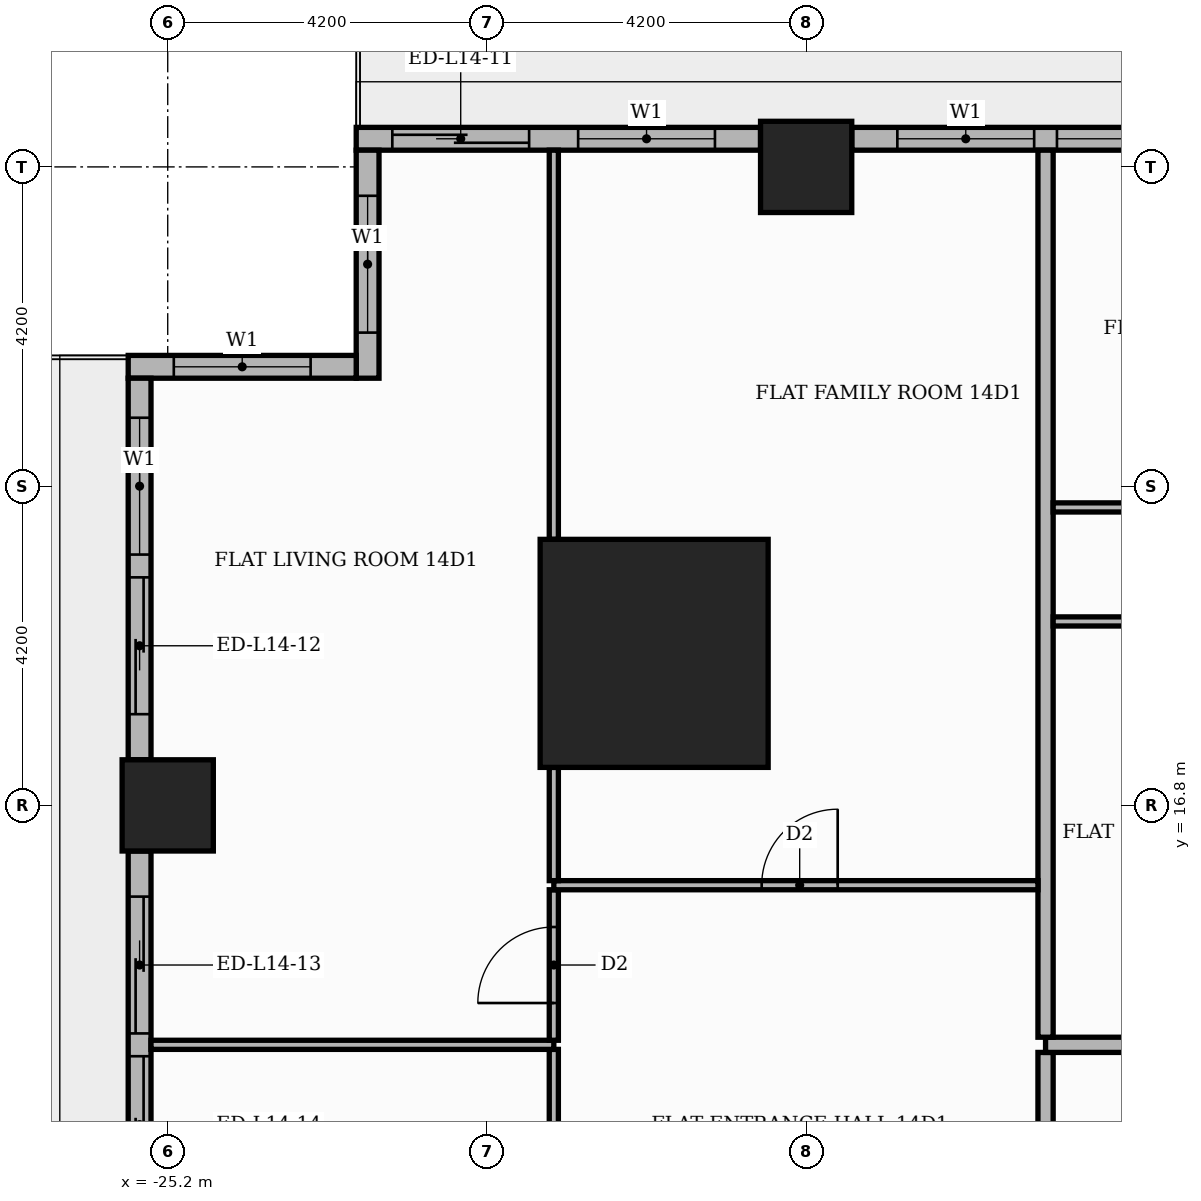
"""IFC4 building model, lengths in metres.
Left out: names, types, materials, properties, quantities, classifications, styles, units other than length and angle.
Written with IfcOpenShell. Run it as: python <this file> out.ifc"""

import sys

from ifc_helpers import new_model, si_unit, direction, frame, frame_2d, origin, origin_2d, place, context, subcontext, project, spatial, rectangle, extrude, element, fill, save


model = new_model("IFC4")
c1 = context("Model", 3, precision=1e-05, world=origin(), true_north=direction((0.0, 1.0)))
c2 = subcontext(c1, "Body", "Model", "MODEL_VIEW")
j1 = project(units=[si_unit("LENGTHUNIT", "METRE"), si_unit("PLANEANGLEUNIT", "RADIAN")], contexts=[c1])
p1 = place(None, origin())
s1 = spatial("IfcSite", under=j1, at=p1, CompositionType="ELEMENT")
p2 = place(p1, origin())
s2 = spatial("IfcBuilding", under=s1, at=p2, CompositionType="ELEMENT")
p3 = place(p2, frame((0.0, 0.0, 62.1)))
s3 = spatial("IfcBuildingStorey", under=s2, at=p3, CompositionType="ELEMENT", Elevation=62.1)
p4 = place(p3, frame((-18.8, 18.8, 0.0), z_axis=(0.0, 0.0, 1.0), x_axis=(1.0, 0.0, 0.0)))
e1 = element("IfcColumn", 1, at=p4, inside=s3, PredefinedType="COLUMN", context=c2, shape_type="SweptSolid", body=[
    extrude(rectangle(XDim=3.0, YDim=3.0, at=origin_2d()), origin(), (0.0, 0.0, 1.0), 3.9),
])
for number, where, z_axis, x_axis in (
    (2, (-16.8, 25.2, 0.0), (0.0, 0.0, 1.0), (1.0, 0.0, 0.0)),
    (3, (-25.2, 16.8, 0.0), (0.0, 0.0, 1.0), (1.0, 0.0, 0.0)),
):
    element("IfcColumn", number, at=place(p3, frame(where, z_axis=z_axis, x_axis=x_axis)), inside=s3, PredefinedType="COLUMN", context=c2, shape_type="SweptSolid", body=[
        extrude(rectangle(XDim=1.2, YDim=1.2, at=origin_2d()), origin(), (0.0, 0.0, 1.0), 3.9),
    ])
p5 = place(p3, frame((-9.0, 25.57, 0.0), z_axis=(0.0, 0.0, 1.0), x_axis=(-1.0, 0.0, 0.0)))
e4 = element("IfcWall", 4, at=p5, inside=s3, PredefinedType="STANDARD", context=c2, shape_type="SweptSolid", body=[
    extrude(rectangle(XDim=7.2, YDim=0.3, at=frame_2d((3.6, 0.0))), origin(), (0.0, 0.0, 1.0), 3.48),
])
p6 = place(p5, frame((0.6, 0.0, 0.9)))
e5 = element("IfcOpeningElement", 5, at=p6, cuts=e4, PredefinedType="OPENING", context=c2, shape_type="SweptSolid", body=[
    extrude(rectangle(XDim=3.9, YDim=2.1, at=frame_2d((1.95, 1.05))), frame((0.0, 0.16, 0.0), z_axis=(0.0, -1.0, 0.0), x_axis=(1.0, 0.0, 0.0)), (0.0, 0.0, 1.0), 0.32),
])
p7 = place(p5, frame((4.8, 0.0, 0.9)))
e6 = element("IfcOpeningElement", 6, at=p7, cuts=e4, PredefinedType="OPENING", context=c2, shape_type="SweptSolid", body=[
    extrude(rectangle(XDim=1.8, YDim=2.1, at=frame_2d((0.9, 1.05))), frame((0.0, 0.16, 0.0), z_axis=(0.0, -1.0, 0.0), x_axis=(1.0, 0.0, 0.0)), (0.0, 0.0, 1.0), 0.32),
])
p8 = place(p3, frame((-17.4, 25.57, 0.0), z_axis=(0.0, 0.0, 1.0), x_axis=(-1.0, 0.0, 0.0)))
e7 = element("IfcWall", 7, at=p8, inside=s3, PredefinedType="STANDARD", context=c2, shape_type="SweptSolid", body=[
    extrude(rectangle(XDim=5.32, YDim=0.3, at=frame_2d((2.66, 0.0))), origin(), (0.0, 0.0, 1.0), 3.48),
])
p9 = place(p8, frame((0.6, 0.0, 0.9)))
e8 = element("IfcOpeningElement", 8, at=p9, cuts=e7, PredefinedType="OPENING", context=c2, shape_type="SweptSolid", body=[
    extrude(rectangle(XDim=1.8, YDim=2.1, at=frame_2d((0.9, 1.05))), frame((0.0, 0.16, 0.0), z_axis=(0.0, -1.0, 0.0), x_axis=(1.0, 0.0, 0.0)), (0.0, 0.0, 1.0), 0.32),
])
p10 = place(p8, frame((3.045, 0.0, 0.0)))
e9 = element("IfcOpeningElement", 9, at=p10, cuts=e7, PredefinedType="OPENING", context=c2, shape_type="SweptSolid", body=[
    extrude(rectangle(XDim=1.8, YDim=2.4, at=frame_2d((0.9, 1.2))), frame((0.0, 0.16, 0.0), z_axis=(0.0, -1.0, 0.0), x_axis=(1.0, 0.0, 0.0)), (0.0, 0.0, 1.0), 0.32),
])
p11 = place(p3, frame((-22.57, 25.42, 0.0), z_axis=(0.0, 0.0, 1.0), x_axis=(0.0, -1.0, 0.0)))
e10 = element("IfcWall", 10, at=p11, inside=s3, PredefinedType="STANDARD", context=c2, shape_type="SweptSolid", body=[
    extrude(rectangle(XDim=3.0, YDim=0.3, at=frame_2d((1.5, 0.0))), origin(), (0.0, 0.0, 1.0), 3.48),
])
p12 = place(p11, frame((0.6, 0.0, 0.9)))
e11 = element("IfcOpeningElement", 11, at=p12, cuts=e10, PredefinedType="OPENING", context=c2, shape_type="SweptSolid", body=[
    extrude(rectangle(XDim=1.8, YDim=2.1, at=frame_2d((0.9, 1.05))), frame((0.0, 0.16, 0.0), z_axis=(0.0, -1.0, 0.0), x_axis=(1.0, 0.0, 0.0)), (0.0, 0.0, 1.0), 0.32),
])
p13 = place(p3, frame((-22.72, 22.57, 0.0), z_axis=(0.0, 0.0, 1.0), x_axis=(-1.0, 0.0, 0.0)))
e12 = element("IfcWall", 12, at=p13, inside=s3, PredefinedType="STANDARD", context=c2, shape_type="SweptSolid", body=[
    extrude(rectangle(XDim=3.0, YDim=0.3, at=frame_2d((1.5, 0.0))), origin(), (0.0, 0.0, 1.0), 3.48),
])
p14 = place(p13, frame((0.6, 0.0, 0.9)))
e13 = element("IfcOpeningElement", 13, at=p14, cuts=e12, PredefinedType="OPENING", context=c2, shape_type="SweptSolid", body=[
    extrude(rectangle(XDim=1.8, YDim=2.1, at=frame_2d((0.9, 1.05))), frame((0.0, 0.16, 0.0), z_axis=(0.0, -1.0, 0.0), x_axis=(1.0, 0.0, 0.0)), (0.0, 0.0, 1.0), 0.32),
])
p15 = place(p3, frame((-25.57, 22.42, 0.0), z_axis=(0.0, 0.0, 1.0), x_axis=(0.0, -1.0, 0.0)))
e14 = element("IfcWall", 14, at=p15, inside=s3, PredefinedType="STANDARD", context=c2, shape_type="SweptSolid", body=[
    extrude(rectangle(XDim=5.02, YDim=0.3, at=frame_2d((2.51, 0.0))), origin(), (0.0, 0.0, 1.0), 3.48),
])
p16 = place(p15, frame((0.52, 0.0, 0.9)))
e15 = element("IfcOpeningElement", 15, at=p16, cuts=e14, PredefinedType="OPENING", context=c2, shape_type="SweptSolid", body=[
    extrude(rectangle(XDim=1.8, YDim=2.1, at=frame_2d((0.9, 1.05))), frame((0.0, 0.16, 0.0), z_axis=(0.0, -1.0, 0.0), x_axis=(1.0, 0.0, 0.0)), (0.0, 0.0, 1.0), 0.32),
])
p17 = place(p15, frame((2.62, 0.0, 0.0)))
e16 = element("IfcOpeningElement", 16, at=p17, cuts=e14, PredefinedType="OPENING", context=c2, shape_type="SweptSolid", body=[
    extrude(rectangle(XDim=1.8, YDim=2.4, at=frame_2d((0.9, 1.2))), frame((0.0, 0.16, 0.0), z_axis=(0.0, -1.0, 0.0), x_axis=(1.0, 0.0, 0.0)), (0.0, 0.0, 1.0), 0.32),
])
p18 = place(p3, frame((-25.57, 16.2, 0.0), z_axis=(0.0, 0.0, 1.0), x_axis=(0.0, -1.0, 0.0)))
e17 = element("IfcWall", 17, at=p18, inside=s3, PredefinedType="STANDARD", context=c2, shape_type="SweptSolid", body=[
    extrude(rectangle(XDim=7.2, YDim=0.3, at=frame_2d((3.6, 0.0))), origin(), (0.0, 0.0, 1.0), 3.48),
])
p19 = place(p18, frame((0.6, 0.0, 0.0)))
e18 = element("IfcOpeningElement", 18, at=p19, cuts=e17, PredefinedType="OPENING", context=c2, shape_type="SweptSolid", body=[
    extrude(rectangle(XDim=1.8, YDim=2.4, at=frame_2d((0.9, 1.2))), frame((0.0, 0.16, 0.0), z_axis=(0.0, -1.0, 0.0), x_axis=(1.0, 0.0, 0.0)), (0.0, 0.0, 1.0), 0.32),
])
p20 = place(p18, frame((2.7, 0.0, 0.0)))
e19 = element("IfcOpeningElement", 19, at=p20, cuts=e17, PredefinedType="OPENING", context=c2, shape_type="SweptSolid", body=[
    extrude(rectangle(XDim=1.8, YDim=2.4, at=frame_2d((0.9, 1.2))), frame((0.0, 0.16, 0.0), z_axis=(0.0, -1.0, 0.0), x_axis=(1.0, 0.0, 0.0)), (0.0, 0.0, 1.0), 0.32),
])
p21 = place(p18, frame((4.8, 0.0, 0.9)))
e20 = element("IfcOpeningElement", 20, at=p21, cuts=e17, PredefinedType="OPENING", context=c2, shape_type="SweptSolid", body=[
    extrude(rectangle(XDim=1.8, YDim=2.1, at=frame_2d((0.9, 1.05))), frame((0.0, 0.16, 0.0), z_axis=(0.0, -1.0, 0.0), x_axis=(1.0, 0.0, 0.0)), (0.0, 0.0, 1.0), 0.32),
])
p22 = place(p3, frame((-13.65, 5.35, 0.0), z_axis=(0.0, 0.0, 1.0), x_axis=(0.0, 1.0, 0.0)))
e21 = element("IfcWall", 21, at=p22, inside=s3, PredefinedType="PARTITIONING", context=c2, shape_type="SweptSolid", body=[
    extrude(rectangle(XDim=8.2, YDim=0.2, at=frame_2d((4.1, 0.0))), origin(), (0.0, 0.0, 1.0), 3.48),
])
p23 = place(p22, frame((5.65, 0.0, 0.0)))
e22 = element("IfcOpeningElement", 22, at=p23, cuts=e21, PredefinedType="OPENING", context=c2, shape_type="SweptSolid", body=[
    extrude(rectangle(XDim=1.1, YDim=2.4, at=frame_2d((0.55, 1.2))), frame((0.0, 0.11, 0.0), z_axis=(0.0, -1.0, 0.0), x_axis=(1.0, 0.0, 0.0)), (0.0, 0.0, 1.0), 0.22),
])
p24 = place(p3, frame((-20.12, 9.51, 0.0), z_axis=(0.0, 0.0, 1.0), x_axis=(0.0, 1.0, 0.0)))
e23 = element("IfcWall", 23, at=p24, inside=s3, PredefinedType="PARTITIONING", context=c2, shape_type="SweptSolid", body=[
    extrude(rectangle(XDim=4.08, YDim=0.12, at=frame_2d((2.04, 0.0))), origin(), (0.0, 0.0, 1.0), 3.48),
])
p25 = place(p24, frame((1.59, 0.0, 0.0)))
e24 = element("IfcOpeningElement", 24, at=p25, cuts=e23, PredefinedType="OPENING", context=c2, shape_type="SweptSolid", body=[
    extrude(rectangle(XDim=0.9, YDim=2.1, at=frame_2d((0.45, 1.05))), frame((0.0, 0.07, 0.0), z_axis=(0.0, -1.0, 0.0), x_axis=(1.0, 0.0, 0.0)), (0.0, 0.0, 1.0), 0.14),
])
p26 = place(p3, frame((-25.42, 13.65, 0.0), z_axis=(0.0, 0.0, 1.0), x_axis=(1.0, 0.0, 0.0)))
e25 = element("IfcWall", 25, at=p26, inside=s3, PredefinedType="PARTITIONING", context=c2, shape_type="SweptSolid", body=[
    extrude(rectangle(XDim=5.3, YDim=0.12, at=frame_2d((2.65, 0.0))), origin(), (0.0, 0.0, 1.0), 3.48),
])
p27 = place(p3, frame((-13.65, 13.65, 0.0), z_axis=(0.0, 0.0, 1.0), x_axis=(1.0, 0.0, 0.0)))
e26 = element("IfcWall", 26, at=p27, inside=s3, PredefinedType="PARTITIONING", context=c2, shape_type="SweptSolid", body=[
    extrude(rectangle(XDim=39.07, YDim=0.2, at=frame_2d((19.535, 0.0))), origin(), (0.0, 0.0, 1.0), 3.48),
])
p28 = place(p27, frame((23.6, 0.0, 0.0)))
e27 = element("IfcOpeningElement", 27, at=p28, cuts=e26, PredefinedType="OPENING", context=c2, shape_type="SweptSolid", body=[
    extrude(rectangle(XDim=1.1, YDim=2.4, at=frame_2d((0.55, 1.2))), frame((0.0, 0.11, 0.0), z_axis=(0.0, -1.0, 0.0), x_axis=(1.0, 0.0, 0.0)), (0.0, 0.0, 1.0), 0.22),
])
p29 = place(p3, frame((-20.12, 13.71, 0.0), z_axis=(0.0, 0.0, 1.0), x_axis=(0.0, 1.0, 0.0)))
e28 = element("IfcWall", 28, at=p29, inside=s3, PredefinedType="PARTITIONING", context=c2, shape_type="SweptSolid", body=[
    extrude(rectangle(XDim=1.98, YDim=0.12, at=frame_2d((0.99, 0.0))), origin(), (0.0, 0.0, 1.0), 3.48),
])
p30 = place(p29, frame((0.49, 0.0, 0.0)))
e29 = element("IfcOpeningElement", 29, at=p30, cuts=e28, PredefinedType="OPENING", context=c2, shape_type="SweptSolid", body=[
    extrude(rectangle(XDim=1.0, YDim=2.1, at=frame_2d((0.5, 1.05))), frame((0.0, 0.07, 0.0), z_axis=(0.0, -1.0, 0.0), x_axis=(1.0, 0.0, 0.0)), (0.0, 0.0, 1.0), 0.14),
])
p31 = place(p3, frame((-13.65, 13.75, 0.0), z_axis=(0.0, 0.0, 1.0), x_axis=(0.0, 1.0, 0.0)))
e30 = element("IfcWall", 30, at=p31, inside=s3, PredefinedType="PARTITIONING", context=c2, shape_type="SweptSolid", body=[
    extrude(rectangle(XDim=11.67, YDim=0.2, at=frame_2d((5.835, 0.0))), origin(), (0.0, 0.0, 1.0), 3.48),
])
p32 = place(p3, frame((-20.12, 15.75, 0.0), z_axis=(0.0, 0.0, 1.0), x_axis=(1.0, 0.0, 0.0)))
e31 = element("IfcWall", 31, at=p32, inside=s3, PredefinedType="PARTITIONING", context=c2, shape_type="SweptSolid", body=[
    extrude(rectangle(XDim=6.37, YDim=0.12, at=frame_2d((3.185, 0.0))), origin(), (0.0, 0.0, 1.0), 3.48),
])
p33 = place(p32, frame((2.735, 0.0, 0.0)))
e32 = element("IfcOpeningElement", 32, at=p33, cuts=e31, PredefinedType="OPENING", context=c2, shape_type="SweptSolid", body=[
    extrude(rectangle(XDim=1.0, YDim=2.1, at=frame_2d((0.5, 1.05))), frame((0.0, 0.07, 0.0), z_axis=(0.0, -1.0, 0.0), x_axis=(1.0, 0.0, 0.0)), (0.0, 0.0, 1.0), 0.14),
])
p34 = place(p3, frame((-20.12, 15.81, 0.0), z_axis=(0.0, 0.0, 1.0), x_axis=(0.0, 1.0, 0.0)))
e33 = element("IfcWall", 33, at=p34, inside=s3, PredefinedType="PARTITIONING", context=c2, shape_type="SweptSolid", body=[
    extrude(rectangle(XDim=1.49, YDim=0.12, at=frame_2d((0.745, 0.0))), origin(), (0.0, 0.0, 1.0), 3.48),
])
p35 = place(p3, frame((-13.55, 19.22, 0.0), z_axis=(0.0, 0.0, 1.0), x_axis=(1.0, 0.0, 0.0)))
e34 = element("IfcWall", 34, at=p35, inside=s3, PredefinedType="PARTITIONING", context=c2, shape_type="SweptSolid", body=[
    extrude(rectangle(XDim=20.9, YDim=0.12, at=frame_2d((10.45, 0.0))), origin(), (0.0, 0.0, 1.0), 3.48),
])
p36 = place(p35, frame((17.3, 0.0, 0.0)))
e35 = element("IfcOpeningElement", 35, at=p36, cuts=e34, PredefinedType="OPENING", context=c2, shape_type="SweptSolid", body=[
    extrude(rectangle(XDim=0.9, YDim=2.1, at=frame_2d((0.45, 1.05))), frame((0.0, 0.07, 0.0), z_axis=(0.0, -1.0, 0.0), x_axis=(1.0, 0.0, 0.0)), (0.0, 0.0, 1.0), 0.14),
])
p37 = place(p35, frame((12.35, 0.0, 0.0)))
e36 = element("IfcOpeningElement", 36, at=p37, cuts=e34, PredefinedType="OPENING", context=c2, shape_type="SweptSolid", body=[
    extrude(rectangle(XDim=0.9, YDim=2.1, at=frame_2d((0.45, 1.05))), frame((0.0, 0.07, 0.0), z_axis=(0.0, -1.0, 0.0), x_axis=(1.0, 0.0, 0.0)), (0.0, 0.0, 1.0), 0.14),
])
p38 = place(p35, frame((9.2, 0.0, 0.0)))
e37 = element("IfcOpeningElement", 37, at=p38, cuts=e34, PredefinedType="OPENING", context=c2, shape_type="SweptSolid", body=[
    extrude(rectangle(XDim=0.9, YDim=2.1, at=frame_2d((0.45, 1.05))), frame((0.0, 0.07, 0.0), z_axis=(0.0, -1.0, 0.0), x_axis=(1.0, 0.0, 0.0)), (0.0, 0.0, 1.0), 0.14),
])
p39 = place(p35, frame((6.725, 0.0, 0.0)))
e38 = element("IfcOpeningElement", 38, at=p39, cuts=e34, PredefinedType="OPENING", context=c2, shape_type="SweptSolid", body=[
    extrude(rectangle(XDim=0.9, YDim=2.1, at=frame_2d((0.45, 1.05))), frame((0.0, 0.07, 0.0), z_axis=(0.0, -1.0, 0.0), x_axis=(1.0, 0.0, 0.0)), (0.0, 0.0, 1.0), 0.14),
])
p40 = place(p35, frame((4.7, 0.0, 0.0)))
e39 = element("IfcOpeningElement", 39, at=p40, cuts=e34, PredefinedType="OPENING", context=c2, shape_type="SweptSolid", body=[
    extrude(rectangle(XDim=0.9, YDim=2.1, at=frame_2d((0.45, 1.05))), frame((0.0, 0.07, 0.0), z_axis=(0.0, -1.0, 0.0), x_axis=(1.0, 0.0, 0.0)), (0.0, 0.0, 1.0), 0.14),
])
p41 = place(p35, frame((1.625, 0.0, 0.0)))
e40 = element("IfcOpeningElement", 40, at=p41, cuts=e34, PredefinedType="OPENING", context=c2, shape_type="SweptSolid", body=[
    extrude(rectangle(XDim=0.9, YDim=2.1, at=frame_2d((0.45, 1.05))), frame((0.0, 0.07, 0.0), z_axis=(0.0, -1.0, 0.0), x_axis=(1.0, 0.0, 0.0)), (0.0, 0.0, 1.0), 0.14),
])
p42 = place(p3, frame((-20.12, 20.3, 0.0), z_axis=(0.0, 0.0, 1.0), x_axis=(0.0, 1.0, 0.0)))
e41 = element("IfcWall", 41, at=p42, inside=s3, PredefinedType="PARTITIONING", context=c2, shape_type="SweptSolid", body=[
    extrude(rectangle(XDim=5.12, YDim=0.12, at=frame_2d((2.56, 0.0))), origin(), (0.0, 0.0, 1.0), 3.48),
])
p43 = place(p3, frame((-13.55, 20.72, 0.0), z_axis=(0.0, 0.0, 1.0), x_axis=(1.0, 0.0, 0.0)))
e42 = element("IfcWall", 42, at=p43, inside=s3, PredefinedType="PARTITIONING", context=c2, shape_type="SweptSolid", body=[
    extrude(rectangle(XDim=38.97, YDim=0.12, at=frame_2d((19.485, 0.0))), origin(), (0.0, 0.0, 1.0), 3.48),
])
p44 = place(p43, frame((25.65, 0.0, 0.0)))
e43 = element("IfcOpeningElement", 43, at=p44, cuts=e42, PredefinedType="OPENING", context=c2, shape_type="SweptSolid", body=[
    extrude(rectangle(XDim=1.0, YDim=2.1, at=frame_2d((0.5, 1.05))), frame((0.0, 0.07, 0.0), z_axis=(0.0, -1.0, 0.0), x_axis=(1.0, 0.0, 0.0)), (0.0, 0.0, 1.0), 0.14),
])
p45 = place(p43, frame((20.45, 0.0, 0.0)))
e44 = element("IfcOpeningElement", 44, at=p45, cuts=e42, PredefinedType="OPENING", context=c2, shape_type="SweptSolid", body=[
    extrude(rectangle(XDim=0.9, YDim=2.1, at=frame_2d((0.45, 1.05))), frame((0.0, 0.07, 0.0), z_axis=(0.0, -1.0, 0.0), x_axis=(1.0, 0.0, 0.0)), (0.0, 0.0, 1.0), 0.14),
])
p46 = place(p43, frame((9.95, 0.0, 0.0)))
e45 = element("IfcOpeningElement", 45, at=p46, cuts=e42, PredefinedType="OPENING", context=c2, shape_type="SweptSolid", body=[
    extrude(rectangle(XDim=0.9, YDim=2.1, at=frame_2d((0.45, 1.05))), frame((0.0, 0.07, 0.0), z_axis=(0.0, -1.0, 0.0), x_axis=(1.0, 0.0, 0.0)), (0.0, 0.0, 1.0), 0.14),
])
p47 = place(p43, frame((2.6, 0.0, 0.0)))
e46 = element("IfcOpeningElement", 46, at=p47, cuts=e42, PredefinedType="OPENING", context=c2, shape_type="SweptSolid", body=[
    extrude(rectangle(XDim=0.9, YDim=2.1, at=frame_2d((0.45, 1.05))), frame((0.0, 0.07, 0.0), z_axis=(0.0, -1.0, 0.0), x_axis=(1.0, 0.0, 0.0)), (0.0, 0.0, 1.0), 0.14),
])
p48 = place(p6, origin())
e47 = element("IfcWindow", 47, at=p48, inside=s3, PartitioningType="SINGLE_PANEL", PredefinedType="WINDOW", context=c2, shape_type="SweptSolid", body=[
    extrude(rectangle(XDim=3.9, YDim=2.1, at=frame_2d((1.95, 1.05))), frame((0.0, 0.03, 0.0), z_axis=(0.0, -1.0, 0.0), x_axis=(1.0, 0.0, 0.0)), (0.0, 0.0, 1.0), 0.06),
])
fill(e5, e47)
p49 = place(p7, origin())
e48 = element("IfcWindow", 48, at=p49, inside=s3, PartitioningType="SINGLE_PANEL", PredefinedType="WINDOW", context=c2, shape_type="SweptSolid", body=[
    extrude(rectangle(XDim=1.8, YDim=2.1, at=frame_2d((0.9, 1.05))), frame((0.0, 0.03, 0.0), z_axis=(0.0, -1.0, 0.0), x_axis=(1.0, 0.0, 0.0)), (0.0, 0.0, 1.0), 0.06),
])
fill(e6, e48)
p50 = place(p9, origin())
e49 = element("IfcWindow", 49, at=p50, inside=s3, PartitioningType="SINGLE_PANEL", PredefinedType="WINDOW", context=c2, shape_type="SweptSolid", body=[
    extrude(rectangle(XDim=1.8, YDim=2.1, at=frame_2d((0.9, 1.05))), frame((0.0, 0.03, 0.0), z_axis=(0.0, -1.0, 0.0), x_axis=(1.0, 0.0, 0.0)), (0.0, 0.0, 1.0), 0.06),
])
fill(e8, e49)
p51 = place(p10, origin())
e50 = element("IfcDoor", 50, at=p51, inside=s3, OperationType="SLIDING_TO_RIGHT", PredefinedType="DOOR", context=c2, shape_type="SweptSolid", body=[
    extrude(rectangle(XDim=1.8, YDim=2.4, at=frame_2d((0.9, 1.2))), frame((0.0, 0.025, 0.0), z_axis=(0.0, -1.0, 0.0), x_axis=(1.0, 0.0, 0.0)), (0.0, 0.0, 1.0), 0.05),
])
fill(e9, e50)
p52 = place(p12, origin())
e51 = element("IfcWindow", 51, at=p52, inside=s3, PartitioningType="SINGLE_PANEL", PredefinedType="WINDOW", context=c2, shape_type="SweptSolid", body=[
    extrude(rectangle(XDim=1.8, YDim=2.1, at=frame_2d((0.9, 1.05))), frame((0.0, 0.03, 0.0), z_axis=(0.0, -1.0, 0.0), x_axis=(1.0, 0.0, 0.0)), (0.0, 0.0, 1.0), 0.06),
])
fill(e11, e51)
p53 = place(p14, origin())
e52 = element("IfcWindow", 52, at=p53, inside=s3, PartitioningType="SINGLE_PANEL", PredefinedType="WINDOW", context=c2, shape_type="SweptSolid", body=[
    extrude(rectangle(XDim=1.8, YDim=2.1, at=frame_2d((0.9, 1.05))), frame((0.0, 0.03, 0.0), z_axis=(0.0, -1.0, 0.0), x_axis=(1.0, 0.0, 0.0)), (0.0, 0.0, 1.0), 0.06),
])
fill(e13, e52)
p54 = place(p16, origin())
e53 = element("IfcWindow", 53, at=p54, inside=s3, PartitioningType="SINGLE_PANEL", PredefinedType="WINDOW", context=c2, shape_type="SweptSolid", body=[
    extrude(rectangle(XDim=1.8, YDim=2.1, at=frame_2d((0.9, 1.05))), frame((0.0, 0.03, 0.0), z_axis=(0.0, -1.0, 0.0), x_axis=(1.0, 0.0, 0.0)), (0.0, 0.0, 1.0), 0.06),
])
fill(e15, e53)
p55 = place(p17, origin())
e54 = element("IfcDoor", 54, at=p55, inside=s3, OperationType="SLIDING_TO_RIGHT", PredefinedType="DOOR", context=c2, shape_type="SweptSolid", body=[
    extrude(rectangle(XDim=1.8, YDim=2.4, at=frame_2d((0.9, 1.2))), frame((0.0, 0.025, 0.0), z_axis=(0.0, -1.0, 0.0), x_axis=(1.0, 0.0, 0.0)), (0.0, 0.0, 1.0), 0.05),
])
fill(e16, e54)
p56 = place(p19, origin())
e55 = element("IfcDoor", 55, at=p56, inside=s3, OperationType="SLIDING_TO_LEFT", PredefinedType="DOOR", context=c2, shape_type="SweptSolid", body=[
    extrude(rectangle(XDim=1.8, YDim=2.4, at=frame_2d((0.9, 1.2))), frame((0.0, 0.025, 0.0), z_axis=(0.0, -1.0, 0.0), x_axis=(1.0, 0.0, 0.0)), (0.0, 0.0, 1.0), 0.05),
])
fill(e18, e55)
p57 = place(p20, origin())
e56 = element("IfcDoor", 56, at=p57, inside=s3, OperationType="SLIDING_TO_RIGHT", PredefinedType="DOOR", context=c2, shape_type="SweptSolid", body=[
    extrude(rectangle(XDim=1.8, YDim=2.4, at=frame_2d((0.9, 1.2))), frame((0.0, 0.025, 0.0), z_axis=(0.0, -1.0, 0.0), x_axis=(1.0, 0.0, 0.0)), (0.0, 0.0, 1.0), 0.05),
])
fill(e19, e56)
p58 = place(p33, origin())
e57 = element("IfcDoor", 57, at=p58, inside=s3, OperationType="SINGLE_SWING_RIGHT", PredefinedType="DOOR", context=c2, shape_type="SweptSolid", body=[
    extrude(rectangle(XDim=1.0, YDim=2.1, at=frame_2d((0.5, 1.05))), frame((0.0, 0.025, 0.0), z_axis=(0.0, -1.0, 0.0), x_axis=(1.0, 0.0, 0.0)), (0.0, 0.0, 1.0), 0.05),
])
fill(e32, e57)
p59 = place(p30, origin())
e58 = element("IfcDoor", 58, at=p59, inside=s3, OperationType="SINGLE_SWING_LEFT", PredefinedType="DOOR", context=c2, shape_type="SweptSolid", body=[
    extrude(rectangle(XDim=1.0, YDim=2.1, at=frame_2d((0.5, 1.05))), frame((0.0, 0.025, 0.0), z_axis=(0.0, -1.0, 0.0), x_axis=(1.0, 0.0, 0.0)), (0.0, 0.0, 1.0), 0.05),
])
fill(e29, e58)
save(model, sys.argv[1])
